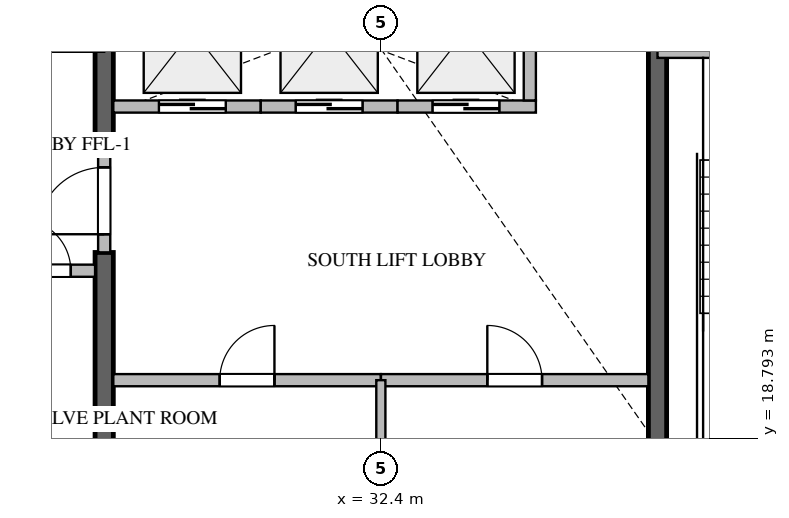
"""IFC4 building model, lengths in metres.
Left out: names, types, materials, properties, quantities, classifications, styles, units other than length and angle.
Written with IfcOpenShell. Run it as: python <this file> out.ifc"""

import sys

from ifc_helpers import new_model, si_unit, direction, frame, frame_2d, origin, place, context, subcontext, project, spatial, rectangle, extrude, source, transform, mapped, element, fill, save


model = new_model("IFC4")
c1 = context("Model", 3, precision=1e-05, world=origin(), true_north=direction((0.0, 1.0)))
c2 = subcontext(c1, "Body", "Model", "MODEL_VIEW")
j1 = project(units=[si_unit("LENGTHUNIT", "METRE"), si_unit("PLANEANGLEUNIT", "RADIAN")], contexts=[c1])
p1 = place(None, origin())
s1 = spatial("IfcSite", under=j1, at=p1, CompositionType="ELEMENT")
p2 = place(p1, origin())
s2 = spatial("IfcBuilding", under=s1, at=p2, CompositionType="ELEMENT")
p3 = place(p2, frame((0.0, 0.0, 138.9)))
s3 = spatial("IfcBuildingStorey", under=s2, at=p3, CompositionType="ELEMENT", Elevation=138.9)
p4 = place(p3, frame((27.85, 17.0, -0.26), z_axis=(0.0, 0.0, 1.0), x_axis=(0.0, 1.0, 0.0)))
e1 = element("IfcWall", 1, at=p4, inside=s3, PredefinedType="SHEAR", context=c2, shape_type="SweptSolid", body=[
    extrude(rectangle(XDim=4.85, YDim=0.3, at=frame_2d((2.425, 0.0))), origin(), (0.0, 0.0, 1.0), 3.748),
])
p5 = place(p3, frame((27.85, 23.55, -0.26), z_axis=(0.0, 0.0, 1.0), x_axis=(0.0, 1.0, 0.0)))
e2 = element("IfcWall", 2, at=p5, inside=s3, PredefinedType="SHEAR", context=c2, shape_type="SweptSolid", body=[
    extrude(rectangle(XDim=9.85, YDim=0.3, at=frame_2d((4.925, 0.0))), origin(), (0.0, 0.0, 1.0), 3.748),
])
p6 = place(p3, frame((36.95, 17.0, -0.26), z_axis=(0.0, 0.0, 1.0), x_axis=(0.0, 1.0, 0.0)))
e3 = element("IfcWall", 3, at=p6, inside=s3, PredefinedType="SHEAR", context=c2, shape_type="SweptSolid", body=[
    extrude(rectangle(XDim=8.35, YDim=0.3, at=frame_2d((4.175, 0.0))), origin(), (0.0, 0.0, 1.0), 3.748),
])
p7 = place(p3, frame((36.95, 25.15, 0.0), z_axis=(0.0, 0.0, 1.0), x_axis=(1.0, 0.0, 0.0)))
e4 = element("IfcWall", 4, at=p7, inside=s3, PredefinedType="STANDARD", context=c2, shape_type="SweptSolid", body=[
    extrude(rectangle(XDim=4.45, YDim=0.2, at=frame_2d((2.225, 0.0))), origin(), (0.0, 0.0, 1.0), 3.49),
])
p8 = place(p7, frame((1.65, 0.0, 0.0)))
e5 = element("IfcOpeningElement", 5, at=p8, cuts=e4, PredefinedType="OPENING", context=c2, shape_type="SweptSolid", body=[
    extrude(rectangle(XDim=1.1, YDim=2.15, at=frame_2d((0.55, 1.075))), frame((0.0, 0.11, 0.0), z_axis=(0.0, -1.0, 0.0), x_axis=(1.0, 0.0, 0.0)), (0.0, 0.0, 1.0), 0.22),
])
p9 = place(p3, frame((28.0, 24.25, 0.0), z_axis=(0.0, 0.0, 1.0), x_axis=(1.0, 0.0, 0.0)))
e6 = element("IfcWall", 6, at=p9, inside=s3, PredefinedType="STANDARD", context=c2, shape_type="SweptSolid", body=[
    extrude(rectangle(XDim=2.425, YDim=0.2, at=frame_2d((1.212, 0.0))), origin(), (0.0, 0.0, 1.0), 3.49),
])
p10 = place(p9, frame((0.75, 0.0, 0.0)))
e7 = element("IfcOpeningElement", 7, at=p10, cuts=e6, PredefinedType="OPENING", context=c2, shape_type="SweptSolid", body=[
    extrude(rectangle(XDim=1.1, YDim=2.2, at=frame_2d((0.55, 1.1))), frame((0.0, 0.11, 0.0), z_axis=(0.0, -1.0, 0.0), x_axis=(1.0, 0.0, 0.0)), (0.0, 0.0, 1.0), 0.22),
])
p11 = place(p3, frame((30.425, 24.25, 0.0), z_axis=(0.0, 0.0, 1.0), x_axis=(1.0, 0.0, 0.0)))
e8 = element("IfcWall", 8, at=p11, inside=s3, PredefinedType="STANDARD", context=c2, shape_type="SweptSolid", body=[
    extrude(rectangle(XDim=2.25, YDim=0.2, at=frame_2d((1.125, 0.0))), origin(), (0.0, 0.0, 1.0), 3.49),
])
p12 = place(p11, frame((0.575, 0.0, 0.0)))
e9 = element("IfcOpeningElement", 9, at=p12, cuts=e8, PredefinedType="OPENING", context=c2, shape_type="SweptSolid", body=[
    extrude(rectangle(XDim=1.1, YDim=2.2, at=frame_2d((0.55, 1.1))), frame((0.0, 0.11, 0.0), z_axis=(0.0, -1.0, 0.0), x_axis=(1.0, 0.0, 0.0)), (0.0, 0.0, 1.0), 0.22),
])
p13 = place(p3, frame((32.675, 24.25, 0.0), z_axis=(0.0, 0.0, 1.0), x_axis=(1.0, 0.0, 0.0)))
e10 = element("IfcWall", 10, at=p13, inside=s3, PredefinedType="STANDARD", context=c2, shape_type="SweptSolid", body=[
    extrude(rectangle(XDim=2.275, YDim=0.2, at=frame_2d((1.137, 0.0))), origin(), (0.0, 0.0, 1.0), 3.49),
])
p14 = place(p13, frame((0.575, 0.0, 0.0)))
e11 = element("IfcOpeningElement", 11, at=p14, cuts=e10, PredefinedType="OPENING", context=c2, shape_type="SweptSolid", body=[
    extrude(rectangle(XDim=1.1, YDim=2.2, at=frame_2d((0.55, 1.1))), frame((0.0, 0.11, 0.0), z_axis=(0.0, -1.0, 0.0), x_axis=(1.0, 0.0, 0.0)), (0.0, 0.0, 1.0), 0.22),
])
p15 = place(p3, frame((34.85, 24.35, 0.0), z_axis=(0.0, 0.0, 1.0), x_axis=(0.0, 1.0, 0.0)))
e12 = element("IfcWall", 12, at=p15, inside=s3, PredefinedType="STANDARD", context=c2, shape_type="SweptSolid", body=[
    extrude(rectangle(XDim=2.5, YDim=0.2, at=frame_2d((1.25, 0.0))), origin(), (0.0, 0.0, 1.0), 3.49),
])
p16 = place(p3, frame((26.052, 21.55, 0.0), z_axis=(0.0, 0.0, 1.0), x_axis=(1.0, 0.0, 0.0)))
e13 = element("IfcWall", 13, at=p16, inside=s3, PredefinedType="STANDARD", context=c2, shape_type="SweptSolid", body=[
    extrude(rectangle(XDim=1.648, YDim=0.2, at=frame_2d((0.824, 0.0))), origin(), (0.0, 0.0, 1.0), 3.49),
])
p17 = place(p16, frame((0.399, 0.0, 0.0)))
e14 = element("IfcOpeningElement", 14, at=p17, cuts=e13, PredefinedType="OPENING", context=c2, shape_type="SweptSolid", body=[
    extrude(rectangle(XDim=0.85, YDim=2.1, at=frame_2d((0.425, 1.05))), frame((0.0, 0.11, 0.0), z_axis=(0.0, -1.0, 0.0), x_axis=(1.0, 0.0, 0.0)), (0.0, 0.0, 1.0), 0.22),
])
p18 = place(p3, frame((27.85, 21.852, 0.0), z_axis=(0.0, 0.0, 1.0), x_axis=(0.0, 1.0, 0.0)))
e15 = element("IfcWall", 15, at=p18, inside=s3, PredefinedType="STANDARD", context=c2, shape_type="SweptSolid", body=[
    extrude(rectangle(XDim=1.696, YDim=0.2, at=frame_2d((0.848, 0.0))), origin(), (0.0, 0.0, 1.0), 3.49),
])
p19 = place(p18, frame((0.298, 0.0, 0.0)))
e16 = element("IfcOpeningElement", 16, at=p19, cuts=e15, PredefinedType="OPENING", context=c2, shape_type="SweptSolid", body=[
    extrude(rectangle(XDim=1.1, YDim=2.15, at=frame_2d((0.55, 1.075))), frame((0.0, 0.11, 0.0), z_axis=(0.0, -1.0, 0.0), x_axis=(1.0, 0.0, 0.0)), (0.0, 0.0, 1.0), 0.22),
])
p20 = place(p3, frame((28.0, 19.75, 0.0), z_axis=(0.0, 0.0, 1.0), x_axis=(1.0, 0.0, 0.0)))
e17 = element("IfcWall", 17, at=p20, inside=s3, PredefinedType="STANDARD", context=c2, shape_type="SweptSolid", body=[
    extrude(rectangle(XDim=4.4, YDim=0.2, at=frame_2d((2.2, 0.0))), origin(), (0.0, 0.0, 1.0), 3.49),
])
p21 = place(p20, frame((1.75, 0.0, 0.0)))
e18 = element("IfcOpeningElement", 18, at=p21, cuts=e17, PredefinedType="OPENING", context=c2, shape_type="SweptSolid", body=[
    extrude(rectangle(XDim=0.9, YDim=2.1, at=frame_2d((0.45, 1.05))), frame((0.0, 0.11, 0.0), z_axis=(0.0, -1.0, 0.0), x_axis=(1.0, 0.0, 0.0)), (0.0, 0.0, 1.0), 0.22),
])
p22 = place(p3, frame((32.402, 19.75, 0.0), z_axis=(0.0, 0.0, 1.0), x_axis=(1.0, 0.0, 0.0)))
e19 = element("IfcWall", 19, at=p22, inside=s3, PredefinedType="STANDARD", context=c2, shape_type="SweptSolid", body=[
    extrude(rectangle(XDim=4.398, YDim=0.2, at=frame_2d((2.199, 0.0))), origin(), (0.0, 0.0, 1.0), 3.49),
])
p23 = place(p22, frame((1.749, 0.0, 0.0)))
e20 = element("IfcOpeningElement", 20, at=p23, cuts=e19, PredefinedType="OPENING", context=c2, shape_type="SweptSolid", body=[
    extrude(rectangle(XDim=0.9, YDim=2.1, at=frame_2d((0.45, 1.05))), frame((0.0, 0.11, 0.0), z_axis=(0.0, -1.0, 0.0), x_axis=(1.0, 0.0, 0.0)), (0.0, 0.0, 1.0), 0.22),
])
p24 = place(p3, frame((32.4, 17.02, 0.0), z_axis=(0.0, 0.0, 1.0), x_axis=(0.0, 1.0, 0.0)))
e21 = element("IfcWall", 21, at=p24, inside=s3, PredefinedType="PARTITIONING", context=c2, shape_type="SweptSolid", body=[
    extrude(rectangle(XDim=2.73, YDim=0.15, at=frame_2d((1.365, 0.0))), origin(), (0.0, 0.0, 1.0), 3.49),
])
m1 = source(origin(), c2, "Body", "SweptSolid", [
    extrude(rectangle(XDim=1.1, YDim=2.2, at=frame_2d((0.55, 1.1))), frame((0.0, 0.025, 0.0), z_axis=(0.0, -1.0, 0.0), x_axis=(1.0, 0.0, 0.0)), (0.0, 0.0, 1.0), 0.05),
])
p25 = place(p10, origin())
e22 = element("IfcDoor", 22, at=p25, inside=s3, OperationType="DOUBLE_DOOR_SLIDING", PredefinedType="DOOR", context=c2, shape_type="MappedRepresentation", body=[
    mapped(m1, transform((0.0, 0.0, 0.0), scale=1.0)),
])
fill(e7, e22)
p26 = place(p12, origin())
e23 = element("IfcDoor", 23, at=p26, inside=s3, OperationType="DOUBLE_DOOR_SLIDING", PredefinedType="DOOR", context=c2, shape_type="MappedRepresentation", body=[
    mapped(m1, transform((0.0, 0.0, 0.0), scale=1.0)),
])
fill(e9, e23)
p27 = place(p14, origin())
e24 = element("IfcDoor", 24, at=p27, inside=s3, OperationType="DOUBLE_DOOR_SLIDING", PredefinedType="DOOR", context=c2, shape_type="MappedRepresentation", body=[
    mapped(m1, transform((0.0, 0.0, 0.0), scale=1.0)),
])
fill(e11, e24)
m2 = source(origin(), c2, "Body", "SweptSolid", [
    extrude(rectangle(XDim=0.85, YDim=2.1, at=frame_2d((0.425, 1.05))), frame((0.0, 0.025, 0.0), z_axis=(0.0, -1.0, 0.0), x_axis=(1.0, 0.0, 0.0)), (0.0, 0.0, 1.0), 0.05),
])
p28 = place(p17, origin())
e25 = element("IfcDoor", 25, at=p28, inside=s3, OperationType="SINGLE_SWING_LEFT", PredefinedType="DOOR", context=c2, shape_type="MappedRepresentation", body=[
    mapped(m2, transform((0.0, 0.0, 0.0), scale=1.0)),
])
fill(e14, e25)
m3 = source(origin(), c2, "Body", "SweptSolid", [
    extrude(rectangle(XDim=1.1, YDim=2.15, at=frame_2d((0.55, 1.075))), frame((0.0, 0.025, 0.0), z_axis=(0.0, -1.0, 0.0), x_axis=(1.0, 0.0, 0.0)), (0.0, 0.0, 1.0), 0.05),
])
p29 = place(p19, origin())
e26 = element("IfcDoor", 26, at=p29, inside=s3, OperationType="SINGLE_SWING_LEFT", PredefinedType="DOOR", context=c2, shape_type="MappedRepresentation", body=[
    mapped(m3, transform((0.0, 0.0, 0.0), scale=1.0)),
])
fill(e16, e26)
m4 = source(origin(), c2, "Body", "SweptSolid", [
    extrude(rectangle(XDim=0.9, YDim=2.1, at=frame_2d((0.45, 1.05))), frame((0.0, 0.025, 0.0), z_axis=(0.0, -1.0, 0.0), x_axis=(1.0, 0.0, 0.0)), (0.0, 0.0, 1.0), 0.05),
])
p30 = place(p21, origin())
e27 = element("IfcDoor", 27, at=p30, inside=s3, OperationType="SINGLE_SWING_RIGHT", PredefinedType="DOOR", context=c2, shape_type="MappedRepresentation", body=[
    mapped(m4, transform((0.0, 0.0, 0.0), scale=1.0)),
])
fill(e18, e27)
p31 = place(p23, origin())
e28 = element("IfcDoor", 28, at=p31, inside=s3, OperationType="SINGLE_SWING_LEFT", PredefinedType="DOOR", context=c2, shape_type="MappedRepresentation", body=[
    mapped(m4, transform((0.0, 0.0, 0.0), scale=1.0)),
])
fill(e20, e28)
save(model, sys.argv[1])
